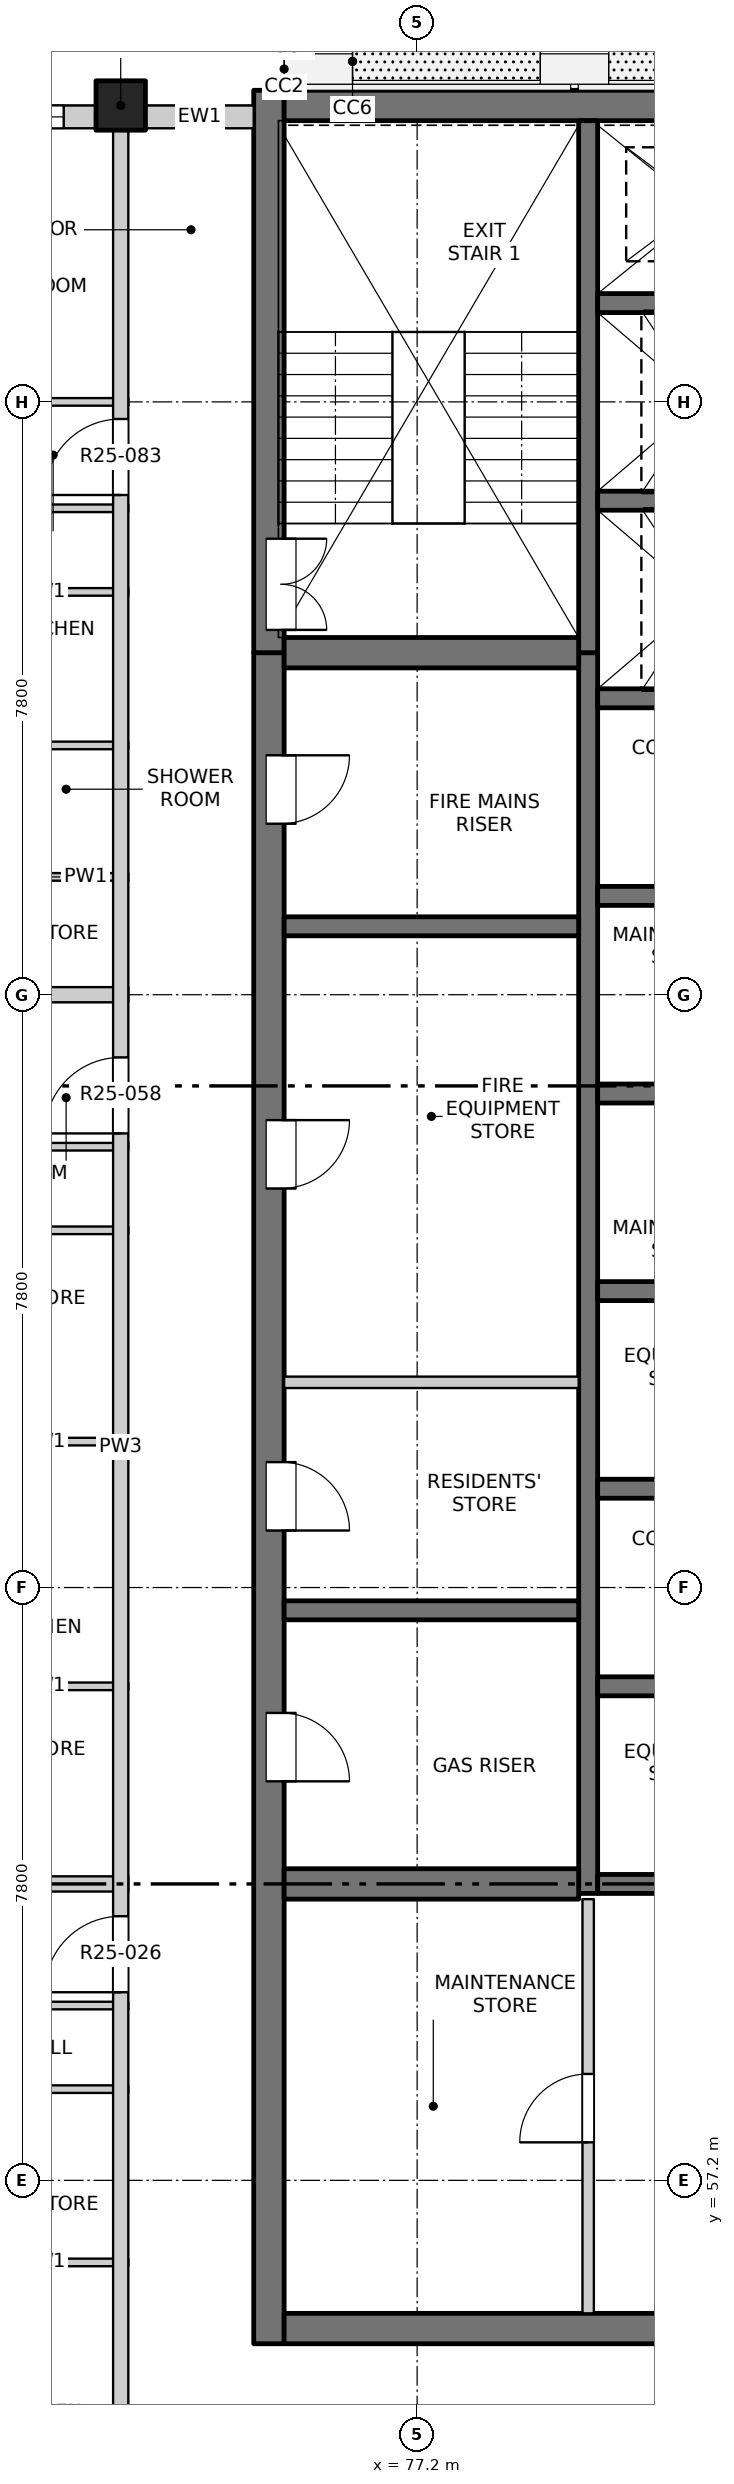
"""IFC4 building model, lengths in metres.
Left out: names, types, materials, properties, quantities, classifications, styles, units other than length and angle.
Written with IfcOpenShell. Run it as: python <this file> out.ifc"""

import sys

from ifc_helpers import new_model, si_unit, direction, frame, frame_2d, origin, origin_2d, place, context, subcontext, project, spatial, rectangle, extrude, element, fill, save


model = new_model("IFC4")
c1 = context("Model", 3, precision=1e-05, world=origin(), true_north=direction((0.0, 1.0)))
c2 = subcontext(c1, "Body", "Model", "MODEL_VIEW")
j1 = project(units=[si_unit("LENGTHUNIT", "METRE"), si_unit("PLANEANGLEUNIT", "RADIAN")], contexts=[c1])
p1 = place(None, origin())
s1 = spatial("IfcSite", under=j1, at=p1, CompositionType="ELEMENT")
p2 = place(p1, origin())
s2 = spatial("IfcBuilding", under=s1, at=p2, CompositionType="ELEMENT")
p3 = place(p2, frame((0.0, 0.0, 252.8)))
s3 = spatial("IfcBuildingStorey", under=s2, at=p3, CompositionType="ELEMENT", Elevation=252.8)
p4 = place(p3, frame((73.3, 84.5, -0.25), z_axis=(0.0, 0.0, 1.0), x_axis=(1.0, 0.0, 0.0)))
e1 = element("IfcColumn", 1, at=p4, inside=s3, PredefinedType="COLUMN", context=c2, shape_type="SweptSolid", body=[
    extrude(rectangle(XDim=0.65, YDim=0.65, at=origin_2d()), origin(), (0.0, 0.0, 1.0), 3.4),
])
p5 = place(p3, frame((75.25, 55.05, -0.25), z_axis=(0.0, 0.0, 1.0), x_axis=(0.0, 1.0, 0.0)))
e2 = element("IfcWall", 2, at=p5, inside=s3, PredefinedType="SOLIDWALL", context=c2, shape_type="SweptSolid", body=[
    extrude(rectangle(XDim=22.25, YDim=0.4, at=frame_2d((11.125, 0.0))), origin(), (0.0, 0.0, 1.0), 3.4),
])
p6 = place(p5, frame((7.4, 0.0, 0.25)))
e3 = element("IfcOpeningElement", 3, at=p6, cuts=e2, PredefinedType="OPENING", context=c2, shape_type="SweptSolid", body=[
    extrude(rectangle(XDim=0.9, YDim=2.1, at=frame_2d((0.45, 1.05))), frame((0.0, 0.21, 0.0), z_axis=(0.0, -1.0, 0.0), x_axis=(1.0, 0.0, 0.0)), (0.0, 0.0, 1.0), 0.42),
])
p7 = place(p5, frame((10.7, 0.0, 0.25)))
e4 = element("IfcOpeningElement", 4, at=p7, cuts=e2, PredefinedType="OPENING", context=c2, shape_type="SweptSolid", body=[
    extrude(rectangle(XDim=0.9, YDim=2.1, at=frame_2d((0.45, 1.05))), frame((0.0, 0.21, 0.0), z_axis=(0.0, -1.0, 0.0), x_axis=(1.0, 0.0, 0.0)), (0.0, 0.0, 1.0), 0.42),
])
p8 = place(p5, frame((15.2, 0.0, 0.25)))
e5 = element("IfcOpeningElement", 5, at=p8, cuts=e2, PredefinedType="OPENING", context=c2, shape_type="SweptSolid", body=[
    extrude(rectangle(XDim=0.9, YDim=2.1, at=frame_2d((0.45, 1.05))), frame((0.0, 0.21, 0.0), z_axis=(0.0, -1.0, 0.0), x_axis=(1.0, 0.0, 0.0)), (0.0, 0.0, 1.0), 0.42),
])
p9 = place(p5, frame((20.0, 0.0, 0.25)))
e6 = element("IfcOpeningElement", 6, at=p9, cuts=e2, PredefinedType="OPENING", context=c2, shape_type="SweptSolid", body=[
    extrude(rectangle(XDim=0.9, YDim=2.1, at=frame_2d((0.45, 1.05))), frame((0.0, 0.21, 0.0), z_axis=(0.0, -1.0, 0.0), x_axis=(1.0, 0.0, 0.0)), (0.0, 0.0, 1.0), 0.42),
])
p10 = place(p3, frame((75.25, 77.3, -0.25), z_axis=(0.0, 0.0, 1.0), x_axis=(0.0, 1.0, 0.0)))
e7 = element("IfcWall", 7, at=p10, inside=s3, PredefinedType="SOLIDWALL", context=c2, shape_type="SweptSolid", body=[
    extrude(rectangle(XDim=7.4, YDim=0.4, at=frame_2d((3.7, 0.0))), origin(), (0.0, 0.0, 1.0), 3.4),
])
p11 = place(p10, frame((0.3, 0.0, 0.25)))
e8 = element("IfcOpeningElement", 8, at=p11, cuts=e7, PredefinedType="OPENING", context=c2, shape_type="SweptSolid", body=[
    extrude(rectangle(XDim=1.2, YDim=2.1, at=frame_2d((0.6, 1.05))), frame((0.0, 0.21, 0.0), z_axis=(0.0, -1.0, 0.0), x_axis=(1.0, 0.0, 0.0)), (0.0, 0.0, 1.0), 0.42),
])
p12 = place(p3, frame((75.45, 55.25, -0.25), z_axis=(0.0, 0.0, 1.0), x_axis=(1.0, 0.0, 0.0)))
e9 = element("IfcWall", 9, at=p12, inside=s3, PredefinedType="SOLIDWALL", context=c2, shape_type="SweptSolid", body=[
    extrude(rectangle(XDim=19.1, YDim=0.4, at=frame_2d((9.55, 0.0))), origin(), (0.0, 0.0, 1.0), 3.4),
])
p13 = place(p12, frame((8.8, 0.0, 0.25)))
e10 = element("IfcOpeningElement", 10, at=p13, cuts=e9, PredefinedType="OPENING", context=c2, shape_type="SweptSolid", body=[
    extrude(rectangle(XDim=1.5, YDim=2.1, at=frame_2d((0.75, 1.05))), frame((0.0, 0.21, 0.0), z_axis=(0.0, -1.0, 0.0), x_axis=(1.0, 0.0, 0.0)), (0.0, 0.0, 1.0), 0.42),
])
p14 = place(p3, frame((75.45, 84.5, -0.25), z_axis=(0.0, 0.0, 1.0), x_axis=(1.0, 0.0, 0.0)))
e11 = element("IfcWall", 11, at=p14, inside=s3, PredefinedType="SOLIDWALL", context=c2, shape_type="SweptSolid", body=[
    extrude(rectangle(XDim=19.1, YDim=0.4, at=frame_2d((9.55, 0.0))), origin(), (0.0, 0.0, 1.0), 3.4),
])
p15 = place(p3, frame((79.45, 60.975, -0.25), z_axis=(0.0, 0.0, 1.0), x_axis=(0.0, 1.0, 0.0)))
e12 = element("IfcWall", 12, at=p15, inside=s3, PredefinedType="SOLIDWALL", context=c2, shape_type="SweptSolid", body=[
    extrude(rectangle(XDim=16.325, YDim=0.25, at=frame_2d((8.163, 0.0))), origin(), (0.0, 0.0, 1.0), 3.4),
])
p16 = place(p3, frame((79.45, 77.3, -0.25), z_axis=(0.0, 0.0, 1.0), x_axis=(0.0, 1.0, 0.0)))
e13 = element("IfcWall", 13, at=p16, inside=s3, PredefinedType="SOLIDWALL", context=c2, shape_type="SweptSolid", body=[
    extrude(rectangle(XDim=7.0, YDim=0.25, at=frame_2d((3.5, 0.0))), origin(), (0.0, 0.0, 1.0), 3.4),
])
for number, where, z_axis, x_axis in (
    (14, (79.575, 61.1, -0.25), (0.0, 0.0, 1.0), (1.0, 0.0, 0.0)),
    (15, (79.575, 63.7, -0.25), (0.0, 0.0, 1.0), (1.0, 0.0, 0.0)),
    (16, (79.575, 66.3, -0.25), (0.0, 0.0, 1.0), (1.0, 0.0, 0.0)),
    (17, (79.575, 68.9, -0.25), (0.0, 0.0, 1.0), (1.0, 0.0, 0.0)),
    (18, (79.575, 71.5, -0.25), (0.0, 0.0, 1.0), (1.0, 0.0, 0.0)),
    (19, (79.575, 74.1, -0.25), (0.0, 0.0, 1.0), (1.0, 0.0, 0.0)),
    (20, (79.575, 76.7, -0.25), (0.0, 0.0, 1.0), (1.0, 0.0, 0.0)),
    (21, (79.575, 79.3, -0.25), (0.0, 0.0, 1.0), (1.0, 0.0, 0.0)),
    (22, (79.575, 81.9, -0.25), (0.0, 0.0, 1.0), (1.0, 0.0, 0.0)),
):
    element("IfcWall", number, at=place(p3, frame(where, z_axis=z_axis, x_axis=x_axis)), inside=s3, PredefinedType="SOLIDWALL", context=c2, shape_type="SweptSolid", body=[
        extrude(rectangle(XDim=3.0, YDim=0.25, at=frame_2d((1.5, 0.0))), origin(), (0.0, 0.0, 1.0), 3.4),
    ])
p17 = place(p3, frame((75.45, 61.1, -0.25), z_axis=(0.0, 0.0, 1.0), x_axis=(1.0, 0.0, 0.0)))
e23 = element("IfcWall", 23, at=p17, inside=s3, PredefinedType="SOLIDWALL", context=c2, shape_type="SweptSolid", body=[
    extrude(rectangle(XDim=3.875, YDim=0.4, at=frame_2d((1.938, 0.0))), origin(), (0.0, 0.0, 1.0), 3.4),
])
for number, where, z_axis, x_axis in (
    (24, (75.45, 64.7, -0.25), (0.0, 0.0, 1.0), (1.0, 0.0, 0.0)),
    (25, (75.45, 73.7, -0.25), (0.0, 0.0, 1.0), (1.0, 0.0, 0.0)),
):
    element("IfcWall", number, at=place(p3, frame(where, z_axis=z_axis, x_axis=x_axis)), inside=s3, PredefinedType="SOLIDWALL", context=c2, shape_type="SweptSolid", body=[
        extrude(rectangle(XDim=3.875, YDim=0.25, at=frame_2d((1.938, 0.0))), origin(), (0.0, 0.0, 1.0), 3.4),
    ])
p18 = place(p3, frame((75.45, 77.3, -0.25), z_axis=(0.0, 0.0, 1.0), x_axis=(1.0, 0.0, 0.0)))
e26 = element("IfcWall", 26, at=p18, inside=s3, PredefinedType="SOLIDWALL", context=c2, shape_type="SweptSolid", body=[
    extrude(rectangle(XDim=3.875, YDim=0.4, at=frame_2d((1.938, 0.0))), origin(), (0.0, 0.0, 1.0), 3.4),
])
p19 = place(p3, frame((69.4, 84.35, 0.0), z_axis=(0.0, 0.0, 1.0), x_axis=(1.0, 0.0, 0.0)))
e27 = element("IfcWall", 27, at=p19, inside=s3, PredefinedType="SOLIDWALL", context=c2, shape_type="SweptSolid", body=[
    extrude(rectangle(XDim=3.575, YDim=0.3, at=frame_2d((1.788, 0.0))), origin(), (0.0, 0.0, 1.0), 2.7),
])
p20 = place(p19, frame((0.75, 0.0, 0.9)))
e28 = element("IfcOpeningElement", 28, at=p20, cuts=e27, PredefinedType="OPENING", context=c2, shape_type="SweptSolid", body=[
    extrude(rectangle(XDim=2.4, YDim=1.8, at=frame_2d((1.2, 0.9))), frame((0.0, 0.16, 0.0), z_axis=(0.0, -1.0, 0.0), x_axis=(1.0, 0.0, 0.0)), (0.0, 0.0, 1.0), 0.32),
])
p21 = place(p3, frame((73.625, 84.35, 0.0), z_axis=(0.0, 0.0, 1.0), x_axis=(1.0, 0.0, 0.0)))
e29 = element("IfcWall", 29, at=p21, inside=s3, PredefinedType="SOLIDWALL", context=c2, shape_type="SweptSolid", body=[
    extrude(rectangle(XDim=1.425, YDim=0.3, at=frame_2d((0.712, 0.0))), origin(), (0.0, 0.0, 1.0), 2.7),
])
for number, where, z_axis, x_axis in (
    (30, (71.18, 56.12, 0.0), (0.0, 0.0, 1.0), (1.0, 0.0, 0.0)),
    (31, (71.18, 58.4, 0.0), (0.0, 0.0, 1.0), (1.0, 0.0, 0.0)),
    (32, (71.18, 59.5, 0.0), (0.0, 0.0, 1.0), (1.0, 0.0, 0.0)),
):
    element("IfcWall", number, at=place(p3, frame(where, z_axis=z_axis, x_axis=x_axis)), inside=s3, PredefinedType="PARTITIONING", context=c2, shape_type="SweptSolid", body=[
        extrude(rectangle(XDim=2.22, YDim=0.1, at=frame_2d((1.11, 0.0))), origin(), (0.0, 0.0, 1.0), 3.15),
    ])
p22 = place(p3, frame((65.8, 61.1, 0.0), z_axis=(0.0, 0.0, 1.0), x_axis=(1.0, 0.0, 0.0)))
e33 = element("IfcWall", 33, at=p22, inside=s3, PredefinedType="PARTITIONING", context=c2, shape_type="SweptSolid", body=[
    extrude(rectangle(XDim=7.6, YDim=0.2, at=frame_2d((3.8, 0.0))), origin(), (0.0, 0.0, 1.0), 2.55),
])
for number, where, z_axis, x_axis in (
    (34, (71.18, 63.7, 0.0), (0.0, 0.0, 1.0), (1.0, 0.0, 0.0)),
    (35, (71.18, 66.92, 0.0), (0.0, 0.0, 1.0), (1.0, 0.0, 0.0)),
):
    element("IfcWall", number, at=place(p3, frame(where, z_axis=z_axis, x_axis=x_axis)), inside=s3, PredefinedType="PARTITIONING", context=c2, shape_type="SweptSolid", body=[
        extrude(rectangle(XDim=2.22, YDim=0.1, at=frame_2d((1.11, 0.0))), origin(), (0.0, 0.0, 1.0), 3.15),
    ])
p23 = place(p3, frame((75.45, 67.7, 0.0), z_axis=(0.0, 0.0, 1.0), x_axis=(1.0, 0.0, 0.0)))
e36 = element("IfcWall", 36, at=p23, inside=s3, PredefinedType="PARTITIONING", context=c2, shape_type="SweptSolid", body=[
    extrude(rectangle(XDim=3.875, YDim=0.15, at=frame_2d((1.938, 0.0))), origin(), (0.0, 0.0, 1.0), 3.15),
])
for number, where, z_axis, x_axis in (
    (37, (71.18, 69.7, 0.0), (0.0, 0.0, 1.0), (1.0, 0.0, 0.0)),
    (38, (71.18, 70.8, 0.0), (0.0, 0.0, 1.0), (1.0, 0.0, 0.0)),
):
    element("IfcWall", number, at=place(p3, frame(where, z_axis=z_axis, x_axis=x_axis)), inside=s3, PredefinedType="PARTITIONING", context=c2, shape_type="SweptSolid", body=[
        extrude(rectangle(XDim=2.22, YDim=0.1, at=frame_2d((1.11, 0.0))), origin(), (0.0, 0.0, 1.0), 3.15),
    ])
p24 = place(p3, frame((65.8, 72.8, 0.0), z_axis=(0.0, 0.0, 1.0), x_axis=(1.0, 0.0, 0.0)))
e39 = element("IfcWall", 39, at=p24, inside=s3, PredefinedType="PARTITIONING", context=c2, shape_type="SweptSolid", body=[
    extrude(rectangle(XDim=7.6, YDim=0.2, at=frame_2d((3.8, 0.0))), origin(), (0.0, 0.0, 1.0), 3.15),
])
for number, where, z_axis, x_axis in (
    (40, (71.18, 74.35, 0.0), (0.0, 0.0, 1.0), (1.0, 0.0, 0.0)),
    (41, (71.18, 76.08, 0.0), (0.0, 0.0, 1.0), (1.0, 0.0, 0.0)),
    (42, (71.18, 78.1, 0.0), (0.0, 0.0, 1.0), (1.0, 0.0, 0.0)),
    (43, (71.18, 79.2, 0.0), (0.0, 0.0, 1.0), (1.0, 0.0, 0.0)),
):
    element("IfcWall", number, at=place(p3, frame(where, z_axis=z_axis, x_axis=x_axis)), inside=s3, PredefinedType="PARTITIONING", context=c2, shape_type="SweptSolid", body=[
        extrude(rectangle(XDim=2.22, YDim=0.1, at=frame_2d((1.11, 0.0))), origin(), (0.0, 0.0, 1.0), 3.15),
    ])
p25 = place(p3, frame((65.8, 80.6, 0.0), z_axis=(0.0, 0.0, 1.0), x_axis=(1.0, 0.0, 0.0)))
e44 = element("IfcWall", 44, at=p25, inside=s3, PredefinedType="PARTITIONING", context=c2, shape_type="SweptSolid", body=[
    extrude(rectangle(XDim=7.6, YDim=0.1, at=frame_2d((3.8, 0.0))), origin(), (0.0, 0.0, 1.0), 3.15),
])
p26 = place(p25, frame((4.09, 0.0, 0.0)))
e45 = element("IfcOpeningElement", 45, at=p26, cuts=e44, PredefinedType="OPENING", context=c2, shape_type="SweptSolid", body=[
    extrude(rectangle(XDim=0.9, YDim=2.1, at=frame_2d((0.45, 1.05))), frame((0.0, 0.06, 0.0), z_axis=(0.0, -1.0, 0.0), x_axis=(1.0, 0.0, 0.0)), (0.0, 0.0, 1.0), 0.12),
])
p27 = place(p3, frame((73.3, 49.5, 0.0), z_axis=(0.0, 0.0, 1.0), x_axis=(0.0, 1.0, 0.0)))
e46 = element("IfcWall", 46, at=p27, inside=s3, PredefinedType="PARTITIONING", context=c2, shape_type="SweptSolid", body=[
    extrude(rectangle(XDim=34.7, YDim=0.2, at=frame_2d((17.35, 0.0))), origin(), (0.0, 0.0, 1.0), 3.15),
])
p28 = place(p27, frame((10.175, 0.0, 0.0)))
e47 = element("IfcOpeningElement", 47, at=p28, cuts=e46, PredefinedType="OPENING", context=c2, shape_type="SweptSolid", body=[
    extrude(rectangle(XDim=1.0, YDim=2.1, at=frame_2d((0.5, 1.05))), frame((0.0, 0.11, 0.0), z_axis=(0.0, -1.0, 0.0), x_axis=(1.0, 0.0, 0.0)), (0.0, 0.0, 1.0), 0.22),
])
p29 = place(p27, frame((21.475, 0.0, 0.0)))
e48 = element("IfcOpeningElement", 48, at=p29, cuts=e46, PredefinedType="OPENING", context=c2, shape_type="SweptSolid", body=[
    extrude(rectangle(XDim=1.0, YDim=2.1, at=frame_2d((0.5, 1.05))), frame((0.0, 0.11, 0.0), z_axis=(0.0, -1.0, 0.0), x_axis=(1.0, 0.0, 0.0)), (0.0, 0.0, 1.0), 0.22),
])
p30 = place(p27, frame((29.875, 0.0, 0.0)))
e49 = element("IfcOpeningElement", 49, at=p30, cuts=e46, PredefinedType="OPENING", context=c2, shape_type="SweptSolid", body=[
    extrude(rectangle(XDim=1.0, YDim=2.1, at=frame_2d((0.5, 1.05))), frame((0.0, 0.11, 0.0), z_axis=(0.0, -1.0, 0.0), x_axis=(1.0, 0.0, 0.0)), (0.0, 0.0, 1.0), 0.22),
])
p31 = place(p3, frame((79.45, 55.45, 0.0), z_axis=(0.0, 0.0, 1.0), x_axis=(0.0, 1.0, 0.0)))
e50 = element("IfcWall", 50, at=p31, inside=s3, PredefinedType="PARTITIONING", context=c2, shape_type="SweptSolid", body=[
    extrude(rectangle(XDim=5.45, YDim=0.15, at=frame_2d((2.725, 0.0))), origin(), (0.0, 0.0, 1.0), 3.15),
])
p32 = place(p31, frame((2.25, 0.0, 0.0)))
e51 = element("IfcOpeningElement", 51, at=p32, cuts=e50, PredefinedType="OPENING", context=c2, shape_type="SweptSolid", body=[
    extrude(rectangle(XDim=0.9, YDim=2.1, at=frame_2d((0.45, 1.05))), frame((0.0, 0.085, 0.0), z_axis=(0.0, -1.0, 0.0), x_axis=(1.0, 0.0, 0.0)), (0.0, 0.0, 1.0), 0.17),
])
p33 = place(p20, origin())
e52 = element("IfcWindow", 52, at=p33, inside=s3, PartitioningType="DOUBLE_PANEL_VERTICAL", PredefinedType="WINDOW", context=c2, shape_type="SweptSolid", body=[
    extrude(rectangle(XDim=2.4, YDim=1.8, at=frame_2d((1.2, 0.9))), frame((0.0, 0.03, 0.0), z_axis=(0.0, -1.0, 0.0), x_axis=(1.0, 0.0, 0.0)), (0.0, 0.0, 1.0), 0.06),
])
fill(e28, e52)
p34 = place(p32, origin())
e53 = element("IfcDoor", 53, at=p34, inside=s3, OperationType="SINGLE_SWING_LEFT", PredefinedType="DOOR", context=c2, shape_type="SweptSolid", body=[
    extrude(rectangle(XDim=0.9, YDim=2.1, at=frame_2d((0.45, 1.05))), frame((0.0, 0.025, 0.0), z_axis=(0.0, -1.0, 0.0), x_axis=(1.0, 0.0, 0.0)), (0.0, 0.0, 1.0), 0.05),
])
fill(e51, e53)
p35 = place(p28, origin())
e54 = element("IfcDoor", 54, at=p35, inside=s3, OperationType="SINGLE_SWING_RIGHT", PredefinedType="DOOR", context=c2, shape_type="SweptSolid", body=[
    extrude(rectangle(XDim=1.0, YDim=2.1, at=frame_2d((0.5, 1.05))), frame((0.0, 0.025, 0.0), z_axis=(0.0, -1.0, 0.0), x_axis=(1.0, 0.0, 0.0)), (0.0, 0.0, 1.0), 0.05),
])
fill(e47, e54)
p36 = place(p6, origin())
e55 = element("IfcDoor", 55, at=p36, inside=s3, OperationType="SINGLE_SWING_RIGHT", PredefinedType="DOOR", context=c2, shape_type="SweptSolid", body=[
    extrude(rectangle(XDim=0.9, YDim=2.1, at=frame_2d((0.45, 1.05))), frame((0.0, -0.135, 0.0), z_axis=(0.0, -1.0, 0.0), x_axis=(1.0, 0.0, 0.0)), (0.0, 0.0, 1.0), 0.05),
])
fill(e3, e55)
p37 = place(p7, origin())
e56 = element("IfcDoor", 56, at=p37, inside=s3, OperationType="SINGLE_SWING_RIGHT", PredefinedType="DOOR", context=c2, shape_type="SweptSolid", body=[
    extrude(rectangle(XDim=0.9, YDim=2.1, at=frame_2d((0.45, 1.05))), frame((0.0, -0.135, 0.0), z_axis=(0.0, -1.0, 0.0), x_axis=(1.0, 0.0, 0.0)), (0.0, 0.0, 1.0), 0.05),
])
fill(e4, e56)
p38 = place(p8, origin())
e57 = element("IfcDoor", 57, at=p38, inside=s3, OperationType="SINGLE_SWING_LEFT", PredefinedType="DOOR", context=c2, shape_type="SweptSolid", body=[
    extrude(rectangle(XDim=0.9, YDim=2.1, at=frame_2d((0.45, 1.05))), frame((0.0, -0.135, 0.0), z_axis=(0.0, -1.0, 0.0), x_axis=(1.0, 0.0, 0.0)), (0.0, 0.0, 1.0), 0.05),
])
fill(e5, e57)
p39 = place(p29, origin())
e58 = element("IfcDoor", 58, at=p39, inside=s3, OperationType="SINGLE_SWING_RIGHT", PredefinedType="DOOR", context=c2, shape_type="SweptSolid", body=[
    extrude(rectangle(XDim=1.0, YDim=2.1, at=frame_2d((0.5, 1.05))), frame((0.0, 0.025, 0.0), z_axis=(0.0, -1.0, 0.0), x_axis=(1.0, 0.0, 0.0)), (0.0, 0.0, 1.0), 0.05),
])
fill(e48, e58)
p40 = place(p9, origin())
e59 = element("IfcDoor", 59, at=p40, inside=s3, OperationType="SINGLE_SWING_LEFT", PredefinedType="DOOR", context=c2, shape_type="SweptSolid", body=[
    extrude(rectangle(XDim=0.9, YDim=2.1, at=frame_2d((0.45, 1.05))), frame((0.0, -0.135, 0.0), z_axis=(0.0, -1.0, 0.0), x_axis=(1.0, 0.0, 0.0)), (0.0, 0.0, 1.0), 0.05),
])
fill(e6, e59)
p41 = place(p11, origin())
e60 = element("IfcDoor", 60, at=p41, inside=s3, OperationType="DOUBLE_DOOR_SINGLE_SWING", PredefinedType="DOOR", context=c2, shape_type="SweptSolid", body=[
    extrude(rectangle(XDim=1.2, YDim=2.1, at=frame_2d((0.6, 1.05))), frame((0.0, -0.135, 0.0), z_axis=(0.0, -1.0, 0.0), x_axis=(1.0, 0.0, 0.0)), (0.0, 0.0, 1.0), 0.05),
])
fill(e8, e60)
p42 = place(p30, origin())
e61 = element("IfcDoor", 61, at=p42, inside=s3, OperationType="SINGLE_SWING_RIGHT", PredefinedType="DOOR", context=c2, shape_type="SweptSolid", body=[
    extrude(rectangle(XDim=1.0, YDim=2.1, at=frame_2d((0.5, 1.05))), frame((0.0, 0.025, 0.0), z_axis=(0.0, -1.0, 0.0), x_axis=(1.0, 0.0, 0.0)), (0.0, 0.0, 1.0), 0.05),
])
fill(e49, e61)
save(model, sys.argv[1])
